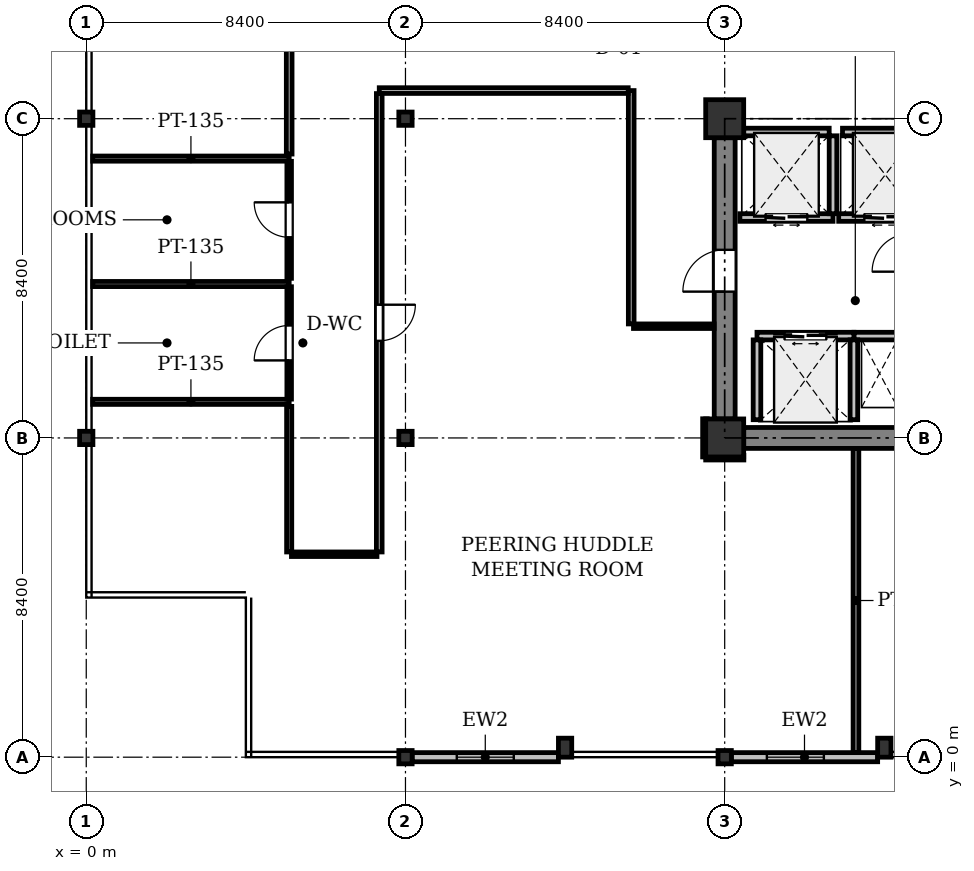
"""IFC4 building model, lengths in metres.
Left out: names, types, materials, properties, quantities, classifications, styles, units other than length and angle.
Written with IfcOpenShell. Run it as: python <this file> out.ifc"""

import sys

from ifc_helpers import new_model, si_unit, direction, frame, frame_2d, origin, origin_2d, place, context, subcontext, project, spatial, rectangle, i_section, extrude, element, fill, save


model = new_model("IFC4")
c1 = context("Model", 3, precision=1e-05, world=origin(), true_north=direction((0.0, 1.0)))
c2 = subcontext(c1, "Body", "Model", "MODEL_VIEW")
j1 = project(units=[si_unit("LENGTHUNIT", "METRE"), si_unit("PLANEANGLEUNIT", "RADIAN")], contexts=[c1])
p1 = place(None, origin())
s1 = spatial("IfcSite", under=j1, at=p1, CompositionType="ELEMENT")
p2 = place(p1, origin())
s2 = spatial("IfcBuilding", under=s1, at=p2, CompositionType="ELEMENT")
p3 = place(p2, frame((0.0, 0.0, 167.3)))
s3 = spatial("IfcBuildingStorey", under=s2, at=p3, CompositionType="ELEMENT", Elevation=167.3)
for number, where, z_axis, x_axis in (
    (1, (0.0, 8.4, 0.0), (0.0, 0.0, 1.0), (1.0, 0.0, 0.0)),
    (2, (0.0, 16.8, 0.0), (0.0, 0.0, 1.0), (1.0, 0.0, 0.0)),
    (3, (8.4, 0.0, 0.0), (0.0, 0.0, 1.0), (1.0, 0.0, 0.0)),
    (4, (8.4, 8.4, 0.0), (0.0, 0.0, 1.0), (1.0, 0.0, 0.0)),
    (5, (8.4, 16.8, 0.0), (0.0, 0.0, 1.0), (1.0, 0.0, 0.0)),
    (6, (16.8, 0.0, 0.0), (0.0, 0.0, 1.0), (1.0, 0.0, 0.0)),
):
    element("IfcColumn", number, at=place(p3, frame(where, z_axis=z_axis, x_axis=x_axis)), inside=s3, PredefinedType="COLUMN", context=c2, shape_type="SweptSolid", body=[
        extrude(i_section(OverallWidth=0.35, OverallDepth=0.35, WebThickness=0.02, FlangeThickness=0.032, at=origin_2d()), origin(), (0.0, 0.0, 1.0), 4.1),
    ])
for number, where, z_axis, x_axis in (
    (7, (16.8, 8.4, 0.0), (0.0, 0.0, 1.0), (1.0, 0.0, 0.0)),
    (8, (16.8, 16.8, 0.0), (0.0, 0.0, 1.0), (1.0, 0.0, 0.0)),
):
    element("IfcColumn", number, at=place(p3, frame(where, z_axis=z_axis, x_axis=x_axis)), inside=s3, PredefinedType="COLUMN", context=c2, shape_type="SweptSolid", body=[
        extrude(rectangle(XDim=1.0, YDim=1.0, at=origin_2d()), origin(), (0.0, 0.0, 1.0), 4.1),
    ])
for number, where, z_axis, x_axis in (
    (9, (12.6, 0.25, 0.0), (0.0, 0.0, 1.0), (1.0, 0.0, 0.0)),
    (10, (21.0, 0.25, 0.0), (0.0, 0.0, 1.0), (1.0, 0.0, 0.0)),
):
    element("IfcColumn", number, at=place(p3, frame(where, z_axis=z_axis, x_axis=x_axis)), inside=s3, PredefinedType="PILASTER", context=c2, shape_type="SweptSolid", body=[
        extrude(rectangle(XDim=0.35, YDim=0.5, at=origin_2d()), origin(), (0.0, 0.0, 1.0), 4.1),
    ])
p4 = place(p3, frame((20.825, 0.0, 0.0), z_axis=(0.0, 0.0, 1.0), x_axis=(-1.0, 0.0, 0.0)))
e11 = element("IfcWall", 11, at=p4, inside=s3, PredefinedType="STANDARD", context=c2, shape_type="SweptSolid", body=[
    extrude(rectangle(XDim=3.85, YDim=0.24, at=frame_2d((1.925, 0.0))), origin(), (0.0, 0.0, 1.0), 3.525),
])
p5 = place(p4, frame((1.415, 0.0, 0.9)))
e12 = element("IfcOpeningElement", 12, at=p5, cuts=e11, PredefinedType="OPENING", context=c2, shape_type="SweptSolid", body=[
    extrude(rectangle(XDim=1.5, YDim=1.6, at=frame_2d((0.75, 0.8))), frame((0.0, 0.13, 0.0), z_axis=(0.0, -1.0, 0.0), x_axis=(1.0, 0.0, 0.0)), (0.0, 0.0, 1.0), 0.26),
])
p6 = place(p3, frame((12.425, 0.0, 0.0), z_axis=(0.0, 0.0, 1.0), x_axis=(-1.0, 0.0, 0.0)))
e13 = element("IfcWall", 13, at=p6, inside=s3, PredefinedType="STANDARD", context=c2, shape_type="SweptSolid", body=[
    extrude(rectangle(XDim=3.85, YDim=0.24, at=frame_2d((1.925, 0.0))), origin(), (0.0, 0.0, 1.0), 3.525),
])
p7 = place(p6, frame((1.175, 0.0, 0.9)))
e14 = element("IfcOpeningElement", 14, at=p7, cuts=e13, PredefinedType="OPENING", context=c2, shape_type="SweptSolid", body=[
    extrude(rectangle(XDim=1.5, YDim=1.6, at=frame_2d((0.75, 0.8))), frame((0.0, 0.13, 0.0), z_axis=(0.0, -1.0, 0.0), x_axis=(1.0, 0.0, 0.0)), (0.0, 0.0, 1.0), 0.26),
])
p8 = place(p3, frame((17.3, 8.4, 0.0), z_axis=(0.0, 0.0, 1.0), x_axis=(1.0, 0.0, 0.0)))
e15 = element("IfcWall", 15, at=p8, inside=s3, PredefinedType="SHEAR", context=c2, shape_type="SweptSolid", body=[
    extrude(rectangle(XDim=7.4, YDim=0.55, at=frame_2d((3.7, 0.0))), origin(), (0.0, 0.0, 1.0), 3.825),
])
p9 = place(p3, frame((16.8, 8.9, 0.0), z_axis=(0.0, 0.0, 1.0), x_axis=(0.0, 1.0, 0.0)))
e16 = element("IfcWall", 16, at=p9, inside=s3, PredefinedType="SHEAR", context=c2, shape_type="SweptSolid", body=[
    extrude(rectangle(XDim=7.4, YDim=0.55, at=frame_2d((3.7, 0.0))), origin(), (0.0, 0.0, 1.0), 3.825),
])
p10 = place(p9, frame((3.35, 0.0, 0.0)))
e17 = element("IfcOpeningElement", 17, at=p10, cuts=e16, PredefinedType="OPENING", context=c2, shape_type="SweptSolid", body=[
    extrude(rectangle(XDim=1.1, YDim=2.15, at=frame_2d((0.55, 1.075))), frame((0.0, 0.285, 0.0), z_axis=(0.0, -1.0, 0.0), x_axis=(1.0, 0.0, 0.0)), (0.0, 0.0, 1.0), 0.57),
])
p11 = place(p3, frame((20.2, 11.08, 0.0), z_axis=(0.0, 0.0, 1.0), x_axis=(1.0, 0.0, 0.0)))
e18 = element("IfcWall", 18, at=p11, inside=s3, PredefinedType="PARTITIONING", context=c2, shape_type="SweptSolid", body=[
    extrude(rectangle(XDim=1.35, YDim=0.2, at=frame_2d((0.675, 0.0))), origin(), (0.0, 0.0, 1.0), 3.825),
])
p12 = place(p3, frame((17.65, 11.08, 0.0), z_axis=(0.0, 0.0, 1.0), x_axis=(1.0, 0.0, 0.0)))
e19 = element("IfcWall", 19, at=p12, inside=s3, PredefinedType="PARTITIONING", context=c2, shape_type="SweptSolid", body=[
    extrude(rectangle(XDim=2.55, YDim=0.2, at=frame_2d((1.275, 0.0))), origin(), (0.0, 0.0, 1.0), 3.825),
])
p13 = place(p12, frame((0.725, 0.0, 0.0)))
e20 = element("IfcOpeningElement", 20, at=p13, cuts=e19, PredefinedType="OPENING", context=c2, shape_type="SweptSolid", body=[
    extrude(rectangle(XDim=1.1, YDim=2.2, at=frame_2d((0.55, 1.1))), frame((0.0, 0.11, 0.0), z_axis=(0.0, -1.0, 0.0), x_axis=(1.0, 0.0, 0.0)), (0.0, 0.0, 1.0), 0.22),
])
for number, where, z_axis, x_axis in (
    (21, (20.2, 8.88, 0.0), (0.0, 0.0, 1.0), (0.0, 1.0, 0.0)),
    (22, (17.65, 8.88, 0.0), (0.0, 0.0, 1.0), (0.0, 1.0, 0.0)),
):
    element("IfcWall", number, at=place(p3, frame(where, z_axis=z_axis, x_axis=x_axis)), inside=s3, PredefinedType="PARTITIONING", context=c2, shape_type="SweptSolid", body=[
        extrude(rectangle(XDim=2.1, YDim=0.2, at=frame_2d((1.05, 0.0))), origin(), (0.0, 0.0, 1.0), 3.825),
    ])
p14 = place(p3, frame((17.2, 14.2, 0.0), z_axis=(0.0, 0.0, 1.0), x_axis=(1.0, 0.0, 0.0)))
e23 = element("IfcWall", 23, at=p14, inside=s3, PredefinedType="PARTITIONING", context=c2, shape_type="SweptSolid", body=[
    extrude(rectangle(XDim=2.45, YDim=0.2, at=frame_2d((1.225, 0.0))), origin(), (0.0, 0.0, 1.0), 3.825),
])
p15 = place(p14, frame((0.675, 0.0, 0.0)))
e24 = element("IfcOpeningElement", 24, at=p15, cuts=e23, PredefinedType="OPENING", context=c2, shape_type="SweptSolid", body=[
    extrude(rectangle(XDim=1.1, YDim=2.2, at=frame_2d((0.55, 1.1))), frame((0.0, 0.11, 0.0), z_axis=(0.0, -1.0, 0.0), x_axis=(1.0, 0.0, 0.0)), (0.0, 0.0, 1.0), 0.22),
])
p16 = place(p3, frame((19.65, 14.3, 0.0), z_axis=(0.0, 0.0, 1.0), x_axis=(0.0, 1.0, 0.0)))
e25 = element("IfcWall", 25, at=p16, inside=s3, PredefinedType="PARTITIONING", context=c2, shape_type="SweptSolid", body=[
    extrude(rectangle(XDim=2.05, YDim=0.2, at=frame_2d((1.025, 0.0))), origin(), (0.0, 0.0, 1.0), 3.825),
])
p17 = place(p3, frame((17.3, 16.45, 0.0), z_axis=(0.0, 0.0, 1.0), x_axis=(1.0, 0.0, 0.0)))
e26 = element("IfcWall", 26, at=p17, inside=s3, PredefinedType="PARTITIONING", context=c2, shape_type="SweptSolid", body=[
    extrude(rectangle(XDim=2.25, YDim=0.2, at=frame_2d((1.125, 0.0))), origin(), (0.0, 0.0, 1.0), 3.825),
])
p18 = place(p3, frame((19.8, 14.2, 0.0), z_axis=(0.0, 0.0, 1.0), x_axis=(1.0, 0.0, 0.0)))
e27 = element("IfcWall", 27, at=p18, inside=s3, PredefinedType="PARTITIONING", context=c2, shape_type="SweptSolid", body=[
    extrude(rectangle(XDim=2.45, YDim=0.2, at=frame_2d((1.225, 0.0))), origin(), (0.0, 0.0, 1.0), 3.825),
])
p19 = place(p18, frame((0.675, 0.0, 0.0)))
e28 = element("IfcOpeningElement", 28, at=p19, cuts=e27, PredefinedType="OPENING", context=c2, shape_type="SweptSolid", body=[
    extrude(rectangle(XDim=1.1, YDim=2.2, at=frame_2d((0.55, 1.1))), frame((0.0, 0.11, 0.0), z_axis=(0.0, -1.0, 0.0), x_axis=(1.0, 0.0, 0.0)), (0.0, 0.0, 1.0), 0.22),
])
p20 = place(p3, frame((19.9, 16.45, 0.0), z_axis=(0.0, 0.0, 1.0), x_axis=(1.0, 0.0, 0.0)))
e29 = element("IfcWall", 29, at=p20, inside=s3, PredefinedType="PARTITIONING", context=c2, shape_type="SweptSolid", body=[
    extrude(rectangle(XDim=2.25, YDim=0.2, at=frame_2d((1.125, 0.0))), origin(), (0.0, 0.0, 1.0), 3.825),
])
for number, where, z_axis, x_axis in (
    (30, (5.34, 12.45, 0.0), (0.0, 0.0, 1.0), (-1.0, 0.0, 0.0)),
    (31, (0.169, 9.35, 0.0), (0.0, 0.0, 1.0), (1.0, 0.0, 0.0)),
):
    element("IfcWall", number, at=place(p3, frame(where, z_axis=z_axis, x_axis=x_axis)), inside=s3, PredefinedType="PARTITIONING", context=c2, shape_type="SweptSolid", body=[
        extrude(rectangle(XDim=5.171, YDim=0.135, at=frame_2d((2.585, 0.0))), origin(), (0.0, 0.0, 1.0), 3.518),
    ])
p21 = place(p3, frame((5.34, 9.421, 0.0), z_axis=(0.0, 0.0, 1.0), x_axis=(0.0, 1.0, 0.0)))
e32 = element("IfcWall", 32, at=p21, inside=s3, PredefinedType="PARTITIONING", context=c2, shape_type="SweptSolid", body=[
    extrude(rectangle(XDim=2.957, YDim=0.12, at=frame_2d((1.479, 0.0))), origin(), (0.0, 0.0, 1.0), 3.825),
])
p22 = place(p21, frame((1.019, 0.0, 0.0)))
e33 = element("IfcOpeningElement", 33, at=p22, cuts=e32, PredefinedType="OPENING", context=c2, shape_type="SweptSolid", body=[
    extrude(rectangle(XDim=0.92, YDim=2.1, at=frame_2d((0.46, 1.05))), frame((0.0, 0.07, 0.0), z_axis=(0.0, -1.0, 0.0), x_axis=(1.0, 0.0, 0.0)), (0.0, 0.0, 1.0), 0.14),
])
p23 = place(p3, frame((5.34, 15.75, 0.0), z_axis=(0.0, 0.0, 1.0), x_axis=(-1.0, 0.0, 0.0)))
e34 = element("IfcWall", 34, at=p23, inside=s3, PredefinedType="PARTITIONING", context=c2, shape_type="SweptSolid", body=[
    extrude(rectangle(XDim=5.171, YDim=0.135, at=frame_2d((2.585, 0.0))), origin(), (0.0, 0.0, 1.0), 3.518),
])
p24 = place(p3, frame((5.34, 12.6, 0.0), z_axis=(0.0, 0.0, 1.0), x_axis=(0.0, 1.0, 0.0)))
e35 = element("IfcWall", 35, at=p24, inside=s3, PredefinedType="PARTITIONING", context=c2, shape_type="SweptSolid", body=[
    extrude(rectangle(XDim=3.078, YDim=0.12, at=frame_2d((1.539, 0.0))), origin(), (0.0, 0.0, 1.0), 3.825),
])
p25 = place(p24, frame((1.079, 0.0, 0.0)))
e36 = element("IfcOpeningElement", 36, at=p25, cuts=e35, PredefinedType="OPENING", context=c2, shape_type="SweptSolid", body=[
    extrude(rectangle(XDim=0.92, YDim=2.1, at=frame_2d((0.46, 1.05))), frame((0.0, 0.07, 0.0), z_axis=(0.0, -1.0, 0.0), x_axis=(1.0, 0.0, 0.0)), (0.0, 0.0, 1.0), 0.14),
])
p26 = place(p3, frame((5.34, 15.87, 0.0), z_axis=(0.0, 0.0, 1.0), x_axis=(0.0, 1.0, 0.0)))
e37 = element("IfcWall", 37, at=p26, inside=s3, PredefinedType="PARTITIONING", context=c2, shape_type="SweptSolid", body=[
    extrude(rectangle(XDim=8.572, YDim=0.15, at=frame_2d((4.286, 0.0))), origin(), (0.0, 0.0, 1.0), 2.425),
])
p27 = place(p26, frame((3.811, 0.0, 0.0)))
e38 = element("IfcOpeningElement", 38, at=p27, cuts=e37, PredefinedType="OPENING", context=c2, shape_type="SweptSolid", body=[
    extrude(rectangle(XDim=0.95, YDim=2.15, at=frame_2d((0.475, 1.075))), frame((0.0, 0.085, 0.0), z_axis=(0.0, -1.0, 0.0), x_axis=(1.0, 0.0, 0.0)), (0.0, 0.0, 1.0), 0.17),
])
p28 = place(p3, frame((20.254, 0.124, 0.0), z_axis=(0.0, 0.0, 1.0), x_axis=(0.0, 1.0, 0.0)))
e39 = element("IfcWall", 39, at=p28, inside=s3, PredefinedType="PARTITIONING", context=c2, shape_type="SweptSolid", body=[
    extrude(rectangle(XDim=7.997, YDim=0.15, at=frame_2d((3.999, 0.0))), origin(), (0.0, 0.0, 1.0), 3.825),
])
p29 = place(p3, frame((17.304, 7.88, 0.0), z_axis=(0.0, 0.0, 1.0), x_axis=(-0.999999881717, -0.000486381265, 0.0)))
e40 = element("IfcWall", 40, at=p29, inside=s3, PredefinedType="PARTITIONING", context=c2, shape_type="SweptSolid", body=[
    extrude(rectangle(XDim=1.004, YDim=0.12, at=frame_2d((0.502, 0.0))), origin(), (0.0, 0.0, 1.0), 3.371),
])
p30 = place(p3, frame((16.28, 7.9, 0.0), z_axis=(0.0, 0.0, 1.0), x_axis=(0.000486381265, 0.999999881717, 0.0)))
e41 = element("IfcWall", 41, at=p30, inside=s3, PredefinedType="PARTITIONING", context=c2, shape_type="SweptSolid", body=[
    extrude(rectangle(XDim=1.004, YDim=0.12, at=frame_2d((0.502, 0.0))), origin(), (0.0, 0.0, 1.0), 2.425),
])
p31 = place(p3, frame((16.521, 11.34, 0.0), z_axis=(0.0, 0.0, 1.0), x_axis=(-1.0, 0.0, 0.0)))
e42 = element("IfcWall", 42, at=p31, inside=s3, PredefinedType="PARTITIONING", context=c2, shape_type="SweptSolid", body=[
    extrude(rectangle(XDim=2.121, YDim=0.12, at=frame_2d((1.061, 0.0))), origin(), (0.0, 0.0, 1.0), 3.825),
])
p32 = place(p3, frame((14.34, 11.4, 0.0), z_axis=(0.0, 0.0, 1.0), x_axis=(0.0, 1.0, 0.0)))
e43 = element("IfcWall", 43, at=p32, inside=s3, PredefinedType="PARTITIONING", context=c2, shape_type="SweptSolid", body=[
    extrude(rectangle(XDim=6.14, YDim=0.15, at=frame_2d((3.07, 0.0))), origin(), (0.0, 0.0, 1.0), 2.425),
])
p33 = place(p3, frame((14.261, 17.54, 0.0), z_axis=(0.0, 0.0, 1.0), x_axis=(-1.0, 0.0, 0.0)))
e44 = element("IfcWall", 44, at=p33, inside=s3, PredefinedType="PARTITIONING", context=c2, shape_type="SweptSolid", body=[
    extrude(rectangle(XDim=6.551, YDim=0.15, at=frame_2d((3.275, 0.0))), origin(), (0.0, 0.0, 1.0), 3.371),
])
p34 = place(p3, frame((7.71, 17.461, 0.0), z_axis=(0.0, 0.0, 1.0), x_axis=(0.0, -1.0, 0.0)))
e45 = element("IfcWall", 45, at=p34, inside=s3, PredefinedType="PARTITIONING", context=c2, shape_type="SweptSolid", body=[
    extrude(rectangle(XDim=12.061, YDim=0.15, at=frame_2d((6.031, 0.0))), origin(), (0.0, 0.0, 1.0), 2.425),
])
p35 = place(p34, frame((5.555, 0.0, 0.0)))
e46 = element("IfcOpeningElement", 46, at=p35, cuts=e45, PredefinedType="OPENING", context=c2, shape_type="SweptSolid", body=[
    extrude(rectangle(XDim=0.95, YDim=2.15, at=frame_2d((0.475, 1.075))), frame((0.0, 0.085, 0.0), z_axis=(0.0, -1.0, 0.0), x_axis=(1.0, 0.0, 0.0)), (0.0, 0.0, 1.0), 0.17),
])
p36 = place(p3, frame((7.65, 5.34, 0.0), z_axis=(0.0, 0.0, 1.0), x_axis=(-1.0, 0.0, 0.0)))
e47 = element("IfcWall", 47, at=p36, inside=s3, PredefinedType="PARTITIONING", context=c2, shape_type="SweptSolid", body=[
    extrude(rectangle(XDim=2.25, YDim=0.12, at=frame_2d((1.125, 0.0))), origin(), (0.0, 0.0, 1.0), 3.825),
])
p37 = place(p3, frame((5.34, 5.4, 0.0), z_axis=(0.0, 0.0, 1.0), x_axis=(0.0, 1.0, 0.0)))
e48 = element("IfcWall", 48, at=p37, inside=s3, PredefinedType="PARTITIONING", context=c2, shape_type="SweptSolid", body=[
    extrude(rectangle(XDim=3.83, YDim=0.135, at=frame_2d((1.915, 0.0))), origin(), (0.0, 0.0, 1.0), 2.425),
])
p38 = place(p5, origin())
e49 = element("IfcWindow", 49, at=p38, inside=s3, PartitioningType="SINGLE_PANEL", PredefinedType="WINDOW", context=c2, shape_type="SweptSolid", body=[
    extrude(rectangle(XDim=1.5, YDim=1.6, at=frame_2d((0.75, 0.8))), frame((0.0, 0.03, 0.0), z_axis=(0.0, -1.0, 0.0), x_axis=(1.0, 0.0, 0.0)), (0.0, 0.0, 1.0), 0.06),
])
fill(e12, e49)
p39 = place(p7, origin())
e50 = element("IfcWindow", 50, at=p39, inside=s3, PartitioningType="SINGLE_PANEL", PredefinedType="WINDOW", context=c2, shape_type="SweptSolid", body=[
    extrude(rectangle(XDim=1.5, YDim=1.6, at=frame_2d((0.75, 0.8))), frame((0.0, 0.03, 0.0), z_axis=(0.0, -1.0, 0.0), x_axis=(1.0, 0.0, 0.0)), (0.0, 0.0, 1.0), 0.06),
])
fill(e14, e50)
p40 = place(p10, origin())
e51 = element("IfcDoor", 51, at=p40, inside=s3, OperationType="SINGLE_SWING_LEFT", PredefinedType="DOOR", context=c2, shape_type="SweptSolid", body=[
    extrude(rectangle(XDim=1.1, YDim=2.15, at=frame_2d((0.55, 1.075))), frame((0.0, 0.025, 0.0), z_axis=(0.0, -1.0, 0.0), x_axis=(1.0, 0.0, 0.0)), (0.0, 0.0, 1.0), 0.05),
])
fill(e17, e51)
p41 = place(p13, origin())
e52 = element("IfcDoor", 52, at=p41, inside=s3, OperationType="DOUBLE_DOOR_SLIDING", PredefinedType="DOOR", context=c2, shape_type="SweptSolid", body=[
    extrude(rectangle(XDim=1.1, YDim=2.2, at=frame_2d((0.55, 1.1))), frame((0.0, 0.025, 0.0), z_axis=(0.0, -1.0, 0.0), x_axis=(1.0, 0.0, 0.0)), (0.0, 0.0, 1.0), 0.05),
])
fill(e20, e52)
p42 = place(p15, origin())
e53 = element("IfcDoor", 53, at=p42, inside=s3, OperationType="DOUBLE_DOOR_SLIDING", PredefinedType="DOOR", context=c2, shape_type="SweptSolid", body=[
    extrude(rectangle(XDim=1.1, YDim=2.2, at=frame_2d((0.55, 1.1))), frame((0.0, 0.025, 0.0), z_axis=(0.0, -1.0, 0.0), x_axis=(1.0, 0.0, 0.0)), (0.0, 0.0, 1.0), 0.05),
])
fill(e24, e53)
p43 = place(p19, origin())
e54 = element("IfcDoor", 54, at=p43, inside=s3, OperationType="DOUBLE_DOOR_SLIDING", PredefinedType="DOOR", context=c2, shape_type="SweptSolid", body=[
    extrude(rectangle(XDim=1.1, YDim=2.2, at=frame_2d((0.55, 1.1))), frame((0.0, 0.025, 0.0), z_axis=(0.0, -1.0, 0.0), x_axis=(1.0, 0.0, 0.0)), (0.0, 0.0, 1.0), 0.05),
])
fill(e28, e54)
p44 = place(p22, origin())
e55 = element("IfcDoor", 55, at=p44, inside=s3, OperationType="SINGLE_SWING_LEFT", PredefinedType="DOOR", context=c2, shape_type="SweptSolid", body=[
    extrude(rectangle(XDim=0.92, YDim=2.1, at=frame_2d((0.46, 1.05))), frame((0.0, 0.025, 0.0), z_axis=(0.0, -1.0, 0.0), x_axis=(1.0, 0.0, 0.0)), (0.0, 0.0, 1.0), 0.05),
])
fill(e33, e55)
p45 = place(p25, origin())
e56 = element("IfcDoor", 56, at=p45, inside=s3, OperationType="SINGLE_SWING_RIGHT", PredefinedType="DOOR", context=c2, shape_type="SweptSolid", body=[
    extrude(rectangle(XDim=0.92, YDim=2.1, at=frame_2d((0.46, 1.05))), frame((0.0, 0.025, 0.0), z_axis=(0.0, -1.0, 0.0), x_axis=(1.0, 0.0, 0.0)), (0.0, 0.0, 1.0), 0.05),
])
fill(e36, e56)
p46 = place(p35, origin())
e57 = element("IfcDoor", 57, at=p46, inside=s3, OperationType="SINGLE_SWING_LEFT", PredefinedType="DOOR", context=c2, shape_type="SweptSolid", body=[
    extrude(rectangle(XDim=0.95, YDim=2.15, at=frame_2d((0.475, 1.075))), frame((0.0, 0.025, 0.0), z_axis=(0.0, -1.0, 0.0), x_axis=(1.0, 0.0, 0.0)), (0.0, 0.0, 1.0), 0.05),
])
fill(e46, e57)
save(model, sys.argv[1])
